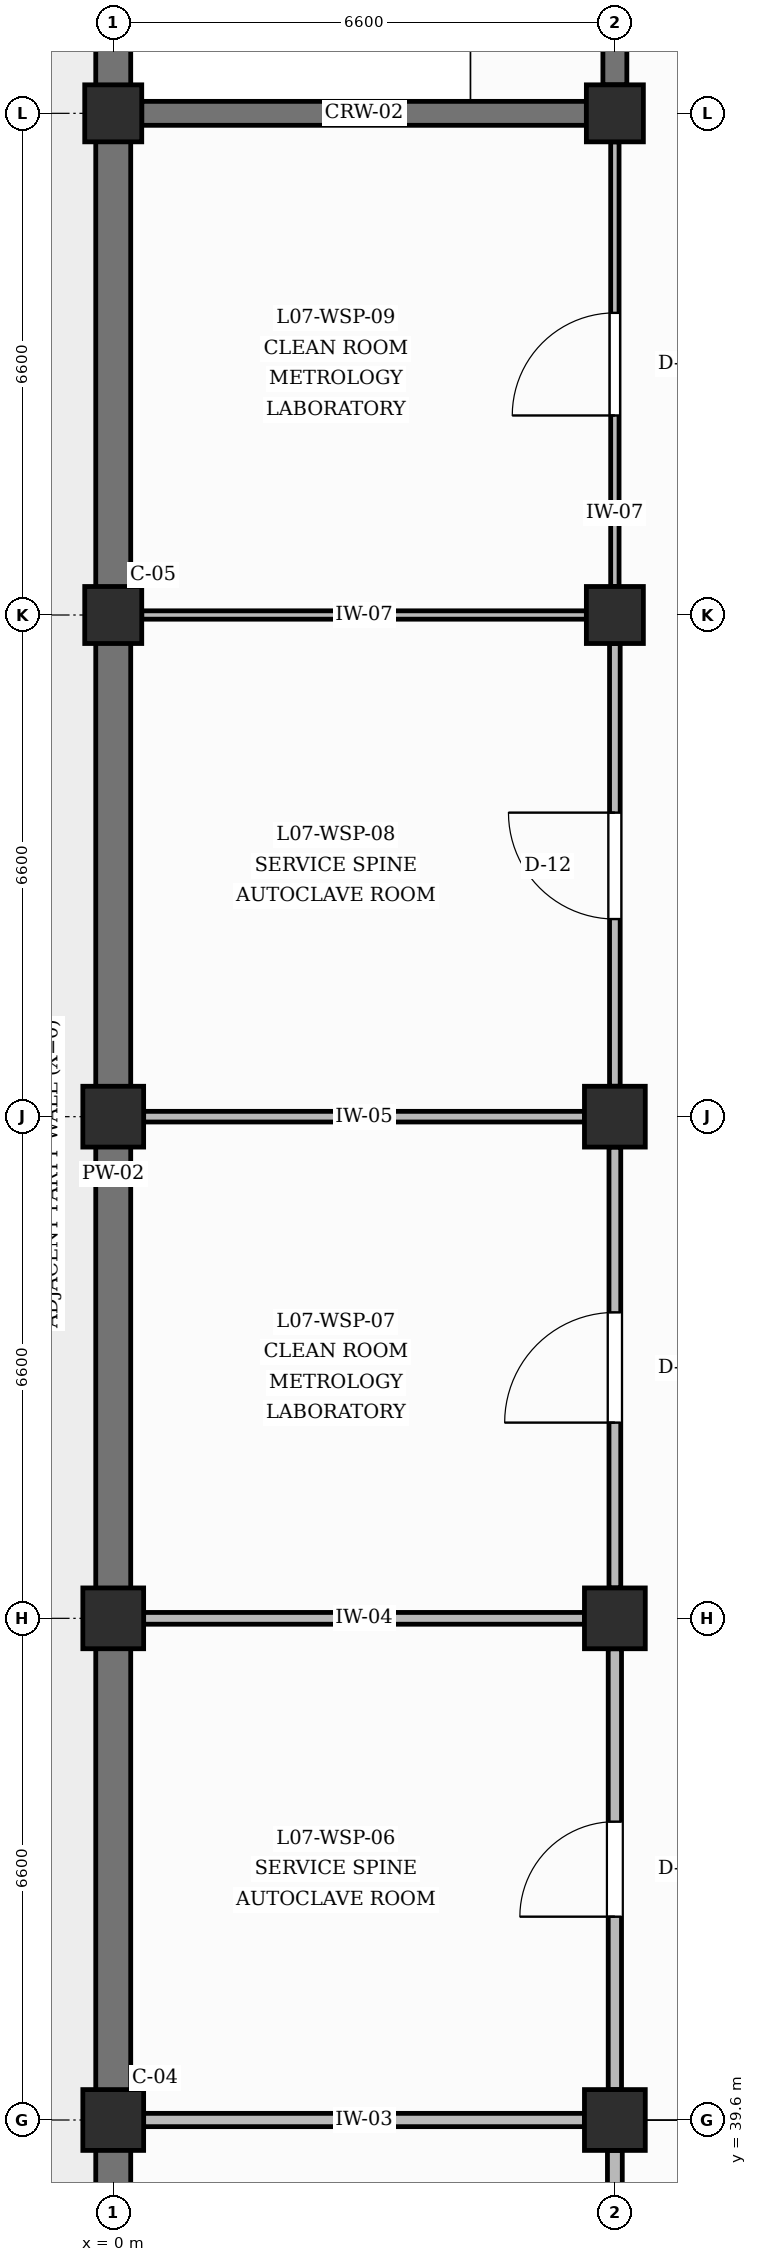
"""IFC4 building model, lengths in metres.
Left out: names, types, materials, properties, quantities, classifications, styles, units other than length and angle.
Written with IfcOpenShell. Run it as: python <this file> out.ifc"""

import sys

from ifc_helpers import new_model, si_unit, direction, frame, frame_2d, origin, origin_2d, place, context, subcontext, project, spatial, rectangle, extrude, element, fill, save


model = new_model("IFC4")
c1 = context("Model", 3, precision=1e-05, world=origin(), true_north=direction((0.0, 1.0)))
c2 = subcontext(c1, "Body", "Model", "MODEL_VIEW")
j1 = project(units=[si_unit("LENGTHUNIT", "METRE"), si_unit("PLANEANGLEUNIT", "RADIAN")], contexts=[c1])
p1 = place(None, origin())
s1 = spatial("IfcSite", under=j1, at=p1, CompositionType="ELEMENT")
p2 = place(p1, origin())
s2 = spatial("IfcBuilding", under=s1, at=p2, CompositionType="ELEMENT")
p3 = place(p2, frame((0.0, 0.0, 31.2)))
s3 = spatial("IfcBuildingStorey", under=s2, at=p3, CompositionType="ELEMENT", Elevation=31.2)
for number, where, z_axis, x_axis in (
    (1, (0.0, 39.6, 0.0), (0.0, 0.0, 1.0), (1.0, 0.0, 0.0)),
    (2, (0.0, 46.2, 0.0), (0.0, 0.0, 1.0), (1.0, 0.0, 0.0)),
    (3, (0.0, 52.8, 0.0), (0.0, 0.0, 1.0), (1.0, 0.0, 0.0)),
):
    element("IfcColumn", number, at=place(p3, frame(where, z_axis=z_axis, x_axis=x_axis)), inside=s3, PredefinedType="COLUMN", context=c2, shape_type="SweptSolid", body=[
        extrude(rectangle(XDim=0.8, YDim=0.8, at=origin_2d()), origin(), (0.0, 0.0, 1.0), 4.2),
    ])
for number, where, z_axis, x_axis in (
    (4, (0.0, 59.4, 0.0), (0.0, 0.0, 1.0), (1.0, 0.0, 0.0)),
    (5, (0.0, 66.0, 0.0), (0.0, 0.0, 1.0), (1.0, 0.0, 0.0)),
):
    element("IfcColumn", number, at=place(p3, frame(where, z_axis=z_axis, x_axis=x_axis)), inside=s3, PredefinedType="COLUMN", context=c2, shape_type="SweptSolid", body=[
        extrude(rectangle(XDim=0.75, YDim=0.75, at=origin_2d()), origin(), (0.0, 0.0, 1.0), 4.2),
    ])
for number, where, z_axis, x_axis in (
    (6, (6.6, 39.6, 0.0), (0.0, 0.0, 1.0), (1.0, 0.0, 0.0)),
    (7, (6.6, 46.2, 0.0), (0.0, 0.0, 1.0), (1.0, 0.0, 0.0)),
    (8, (6.6, 52.8, 0.0), (0.0, 0.0, 1.0), (1.0, 0.0, 0.0)),
):
    element("IfcColumn", number, at=place(p3, frame(where, z_axis=z_axis, x_axis=x_axis)), inside=s3, PredefinedType="COLUMN", context=c2, shape_type="SweptSolid", body=[
        extrude(rectangle(XDim=0.8, YDim=0.8, at=origin_2d()), origin(), (0.0, 0.0, 1.0), 4.2),
    ])
for number, where, z_axis, x_axis in (
    (9, (6.6, 59.4, 0.0), (0.0, 0.0, 1.0), (1.0, 0.0, 0.0)),
    (10, (6.6, 66.0, 0.0), (0.0, 0.0, 1.0), (1.0, 0.0, 0.0)),
):
    element("IfcColumn", number, at=place(p3, frame(where, z_axis=z_axis, x_axis=x_axis)), inside=s3, PredefinedType="COLUMN", context=c2, shape_type="SweptSolid", body=[
        extrude(rectangle(XDim=0.75, YDim=0.75, at=origin_2d()), origin(), (0.0, 0.0, 1.0), 4.2),
    ])
for number, where, z_axis, x_axis in (
    (11, (0.0, 33.4, 0.0), (0.0, 0.0, 1.0), (0.0, 1.0, 0.0)),
    (12, (0.0, 40.0, 0.0), (0.0, 0.0, 1.0), (0.0, 1.0, 0.0)),
):
    element("IfcWall", number, at=place(p3, frame(where, z_axis=z_axis, x_axis=x_axis)), inside=s3, PredefinedType="SOLIDWALL", context=c2, shape_type="SweptSolid", body=[
        extrude(rectangle(XDim=5.8, YDim=0.46, at=frame_2d((2.9, 0.0))), origin(), (0.0, 0.0, 1.0), 3.28),
    ])
p4 = place(p3, frame((0.0, 46.6, 0.0), z_axis=(0.0, 0.0, 1.0), x_axis=(0.0, 1.0, 0.0)))
e13 = element("IfcWall", 13, at=p4, inside=s3, PredefinedType="SOLIDWALL", context=c2, shape_type="SweptSolid", body=[
    extrude(rectangle(XDim=5.8, YDim=0.46, at=frame_2d((2.9, 0.0))), origin(), (0.0, 0.0, 1.0), 3.28),
])
p5 = place(p3, frame((0.0, 53.2, 0.0), z_axis=(0.0, 0.0, 1.0), x_axis=(0.0, 1.0, 0.0)))
e14 = element("IfcWall", 14, at=p5, inside=s3, PredefinedType="SOLIDWALL", context=c2, shape_type="SweptSolid", body=[
    extrude(rectangle(XDim=5.825, YDim=0.46, at=frame_2d((2.913, 0.0))), origin(), (0.0, 0.0, 1.0), 3.28),
])
for number, where, z_axis, x_axis in (
    (15, (0.0, 59.775, 0.0), (0.0, 0.0, 1.0), (0.0, 1.0, 0.0)),
    (16, (0.0, 66.375, 0.0), (0.0, 0.0, 1.0), (0.0, 1.0, 0.0)),
):
    element("IfcWall", number, at=place(p3, frame(where, z_axis=z_axis, x_axis=x_axis)), inside=s3, PredefinedType="SOLIDWALL", context=c2, shape_type="SweptSolid", body=[
        extrude(rectangle(XDim=5.85, YDim=0.46, at=frame_2d((2.925, 0.0))), origin(), (0.0, 0.0, 1.0), 3.28),
    ])
p6 = place(p3, frame((0.375, 66.0, 0.0), z_axis=(0.0, 0.0, 1.0), x_axis=(1.0, 0.0, 0.0)))
e17 = element("IfcWall", 17, at=p6, inside=s3, PredefinedType="SHEAR", context=c2, shape_type="SweptSolid", body=[
    extrude(rectangle(XDim=5.85, YDim=0.315, at=frame_2d((2.925, 0.0))), origin(), (0.0, 0.0, 1.0), 3.18),
])
p7 = place(p3, frame((6.6, 66.375, 0.0), z_axis=(0.0, 0.0, 1.0), x_axis=(0.0, 1.0, 0.0)))
e18 = element("IfcWall", 18, at=p7, inside=s3, PredefinedType="SHEAR", context=c2, shape_type="SweptSolid", body=[
    extrude(rectangle(XDim=5.85, YDim=0.315, at=frame_2d((2.925, 0.0))), origin(), (0.0, 0.0, 1.0), 3.18),
])
p8 = place(p7, frame((2.375, 0.0, 0.0)))
e19 = element("IfcOpeningElement", 19, at=p8, cuts=e18, PredefinedType="OPENING", context=c2, shape_type="SweptSolid", body=[
    extrude(rectangle(XDim=1.1, YDim=2.15, at=frame_2d((0.55, 1.075))), frame((0.0, 0.167, 0.0), z_axis=(0.0, -1.0, 0.0), x_axis=(1.0, 0.0, 0.0)), (0.0, 0.0, 1.0), 0.335),
])
p9 = place(p3, frame((6.6, 33.4, 0.0), z_axis=(0.0, 0.0, 1.0), x_axis=(0.0, 1.0, 0.0)))
e20 = element("IfcWall", 20, at=p9, inside=s3, PredefinedType="PARTITIONING", context=c2, shape_type="SweptSolid", body=[
    extrude(rectangle(XDim=5.8, YDim=0.195, at=frame_2d((2.9, 0.0))), origin(), (0.0, 0.0, 1.0), 3.18),
])
p10 = place(p9, frame((2.25, 0.0, 0.0)))
e21 = element("IfcOpeningElement", 21, at=p10, cuts=e20, PredefinedType="OPENING", context=c2, shape_type="SweptSolid", body=[
    extrude(rectangle(XDim=1.3, YDim=2.3, at=frame_2d((0.65, 1.15))), frame((0.0, 0.107, 0.0), z_axis=(0.0, -1.0, 0.0), x_axis=(1.0, 0.0, 0.0)), (0.0, 0.0, 1.0), 0.215),
])
p11 = place(p3, frame((0.4, 39.6, 0.0), z_axis=(0.0, 0.0, 1.0), x_axis=(1.0, 0.0, 0.0)))
e22 = element("IfcWall", 22, at=p11, inside=s3, PredefinedType="PARTITIONING", context=c2, shape_type="SweptSolid", body=[
    extrude(rectangle(XDim=5.8, YDim=0.175, at=frame_2d((2.9, 0.0))), origin(), (0.0, 0.0, 1.0), 3.18),
])
p12 = place(p3, frame((6.6, 40.0, 0.0), z_axis=(0.0, 0.0, 1.0), x_axis=(0.0, 1.0, 0.0)))
e23 = element("IfcWall", 23, at=p12, inside=s3, PredefinedType="PARTITIONING", context=c2, shape_type="SweptSolid", body=[
    extrude(rectangle(XDim=5.8, YDim=0.175, at=frame_2d((2.9, 0.0))), origin(), (0.0, 0.0, 1.0), 3.18),
])
p13 = place(p12, frame((2.275, 0.0, 0.0)))
e24 = element("IfcOpeningElement", 24, at=p13, cuts=e23, PredefinedType="OPENING", context=c2, shape_type="SweptSolid", body=[
    extrude(rectangle(XDim=1.25, YDim=2.25, at=frame_2d((0.625, 1.125))), frame((0.0, 0.097, 0.0), z_axis=(0.0, -1.0, 0.0), x_axis=(1.0, 0.0, 0.0)), (0.0, 0.0, 1.0), 0.195),
])
p14 = place(p3, frame((0.4, 46.2, 0.0), z_axis=(0.0, 0.0, 1.0), x_axis=(1.0, 0.0, 0.0)))
e25 = element("IfcWall", 25, at=p14, inside=s3, PredefinedType="PARTITIONING", context=c2, shape_type="SweptSolid", body=[
    extrude(rectangle(XDim=5.8, YDim=0.155, at=frame_2d((2.9, 0.0))), origin(), (0.0, 0.0, 1.0), 3.18),
])
p15 = place(p3, frame((6.6, 46.6, 0.0), z_axis=(0.0, 0.0, 1.0), x_axis=(0.0, 1.0, 0.0)))
e26 = element("IfcWall", 26, at=p15, inside=s3, PredefinedType="PARTITIONING", context=c2, shape_type="SweptSolid", body=[
    extrude(rectangle(XDim=5.8, YDim=0.155, at=frame_2d((2.9, 0.0))), origin(), (0.0, 0.0, 1.0), 3.18),
])
p16 = place(p15, frame((2.175, 0.0, 0.0)))
e27 = element("IfcOpeningElement", 27, at=p16, cuts=e26, PredefinedType="OPENING", context=c2, shape_type="SweptSolid", body=[
    extrude(rectangle(XDim=1.45, YDim=2.25, at=frame_2d((0.725, 1.125))), frame((0.0, 0.087, 0.0), z_axis=(0.0, -1.0, 0.0), x_axis=(1.0, 0.0, 0.0)), (0.0, 0.0, 1.0), 0.175),
])
p17 = place(p3, frame((0.4, 52.8, 0.0), z_axis=(0.0, 0.0, 1.0), x_axis=(1.0, 0.0, 0.0)))
e28 = element("IfcWall", 28, at=p17, inside=s3, PredefinedType="PARTITIONING", context=c2, shape_type="SweptSolid", body=[
    extrude(rectangle(XDim=5.8, YDim=0.14, at=frame_2d((2.9, 0.0))), origin(), (0.0, 0.0, 1.0), 3.18),
])
p18 = place(p3, frame((6.6, 53.2, 0.0), z_axis=(0.0, 0.0, 1.0), x_axis=(0.0, 1.0, 0.0)))
e29 = element("IfcWall", 29, at=p18, inside=s3, PredefinedType="PARTITIONING", context=c2, shape_type="SweptSolid", body=[
    extrude(rectangle(XDim=5.825, YDim=0.14, at=frame_2d((2.913, 0.0))), origin(), (0.0, 0.0, 1.0), 3.18),
])
p19 = place(p18, frame((2.2, 0.0, 0.0)))
e30 = element("IfcOpeningElement", 30, at=p19, cuts=e29, PredefinedType="OPENING", context=c2, shape_type="SweptSolid", body=[
    extrude(rectangle(XDim=1.4, YDim=2.25, at=frame_2d((0.7, 1.125))), frame((0.0, 0.08, 0.0), z_axis=(0.0, -1.0, 0.0), x_axis=(1.0, 0.0, 0.0)), (0.0, 0.0, 1.0), 0.16),
])
p20 = place(p3, frame((0.375, 59.4, 0.0), z_axis=(0.0, 0.0, 1.0), x_axis=(1.0, 0.0, 0.0)))
e31 = element("IfcWall", 31, at=p20, inside=s3, PredefinedType="PARTITIONING", context=c2, shape_type="SweptSolid", body=[
    extrude(rectangle(XDim=5.85, YDim=0.11, at=frame_2d((2.925, 0.0))), origin(), (0.0, 0.0, 1.0), 3.18),
])
p21 = place(p3, frame((6.6, 59.775, 0.0), z_axis=(0.0, 0.0, 1.0), x_axis=(0.0, 1.0, 0.0)))
e32 = element("IfcWall", 32, at=p21, inside=s3, PredefinedType="PARTITIONING", context=c2, shape_type="SweptSolid", body=[
    extrude(rectangle(XDim=5.85, YDim=0.11, at=frame_2d((2.925, 0.0))), origin(), (0.0, 0.0, 1.0), 3.18),
])
p22 = place(p21, frame((2.25, 0.0, 0.0)))
e33 = element("IfcOpeningElement", 33, at=p22, cuts=e32, PredefinedType="OPENING", context=c2, shape_type="SweptSolid", body=[
    extrude(rectangle(XDim=1.35, YDim=2.3, at=frame_2d((0.675, 1.15))), frame((0.0, 0.065, 0.0), z_axis=(0.0, -1.0, 0.0), x_axis=(1.0, 0.0, 0.0)), (0.0, 0.0, 1.0), 0.13),
])
p23 = place(p13, origin())
e34 = element("IfcDoor", 34, at=p23, inside=s3, OperationType="SINGLE_SWING_LEFT", PredefinedType="DOOR", context=c2, shape_type="SweptSolid", body=[
    extrude(rectangle(XDim=1.25, YDim=2.25, at=frame_2d((0.625, 1.125))), frame((0.0, 0.025, 0.0), z_axis=(0.0, -1.0, 0.0), x_axis=(1.0, 0.0, 0.0)), (0.0, 0.0, 1.0), 0.05),
])
fill(e24, e34)
p24 = place(p16, origin())
e35 = element("IfcDoor", 35, at=p24, inside=s3, OperationType="SINGLE_SWING_LEFT", PredefinedType="DOOR", context=c2, shape_type="SweptSolid", body=[
    extrude(rectangle(XDim=1.45, YDim=2.25, at=frame_2d((0.725, 1.125))), frame((0.0, 0.025, 0.0), z_axis=(0.0, -1.0, 0.0), x_axis=(1.0, 0.0, 0.0)), (0.0, 0.0, 1.0), 0.05),
])
fill(e27, e35)
p25 = place(p19, origin())
e36 = element("IfcDoor", 36, at=p25, inside=s3, OperationType="SINGLE_SWING_RIGHT", PredefinedType="DOOR", context=c2, shape_type="SweptSolid", body=[
    extrude(rectangle(XDim=1.4, YDim=2.25, at=frame_2d((0.7, 1.125))), frame((0.0, 0.025, 0.0), z_axis=(0.0, -1.0, 0.0), x_axis=(1.0, 0.0, 0.0)), (0.0, 0.0, 1.0), 0.05),
])
fill(e30, e36)
p26 = place(p22, origin())
e37 = element("IfcDoor", 37, at=p26, inside=s3, OperationType="SINGLE_SWING_LEFT", PredefinedType="DOOR", context=c2, shape_type="SweptSolid", body=[
    extrude(rectangle(XDim=1.35, YDim=2.3, at=frame_2d((0.675, 1.15))), frame((0.0, 0.025, 0.0), z_axis=(0.0, -1.0, 0.0), x_axis=(1.0, 0.0, 0.0)), (0.0, 0.0, 1.0), 0.05),
])
fill(e33, e37)
save(model, sys.argv[1])
